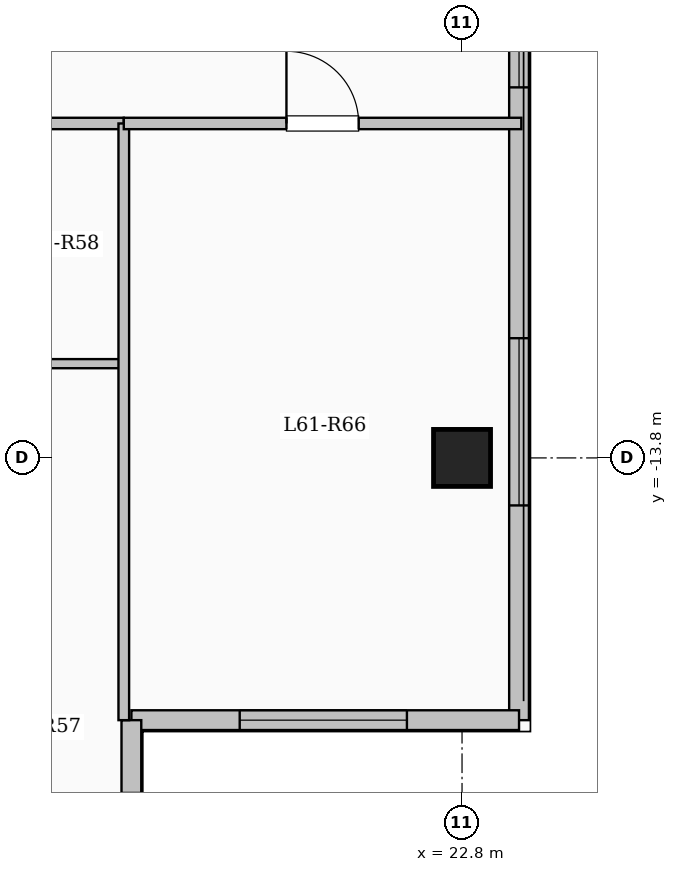
"""IFC4 building model, lengths in metres.
Left out: names, types, materials, properties, quantities, classifications, styles, units other than length and angle.
Written with IfcOpenShell. Run it as: python <this file> out.ifc"""

import sys

from ifc_helpers import new_model, si_unit, direction, frame, frame_2d, origin, origin_2d, place, context, subcontext, project, spatial, rectangle, extrude, element, fill, save


model = new_model("IFC4")
c1 = context("Model", 3, precision=1e-05, world=origin(), true_north=direction((0.0, 1.0)))
c2 = subcontext(c1, "Body", "Model", "MODEL_VIEW")
j1 = project(units=[si_unit("LENGTHUNIT", "METRE"), si_unit("PLANEANGLEUNIT", "RADIAN")], contexts=[c1])
p1 = place(None, origin())
s1 = spatial("IfcSite", under=j1, at=p1, CompositionType="ELEMENT")
p2 = place(p1, origin())
s2 = spatial("IfcBuilding", under=s1, at=p2, CompositionType="ELEMENT")
p3 = place(p2, frame((0.0, 0.0, 223.75)))
s3 = spatial("IfcBuildingStorey", under=s2, at=p3, CompositionType="ELEMENT", Elevation=223.75)
p4 = place(p3, frame((22.8, -13.8, 0.0), z_axis=(0.0, 0.0, 1.0), x_axis=(1.0, 0.0, 0.0)))
e1 = element("IfcColumn", 1, at=p4, inside=s3, PredefinedType="COLUMN", context=c2, shape_type="SweptSolid", body=[
    extrude(rectangle(XDim=0.75, YDim=0.75, at=origin_2d()), origin(), (0.0, 0.0, 1.0), 3.35),
])
p5 = place(p3, frame((23.55, 17.25, 0.0), z_axis=(0.0, 0.0, 1.0), x_axis=(0.0, -1.0, 0.0)))
e2 = element("IfcWall", 2, at=p5, inside=s3, PredefinedType="SOLIDWALL", context=c2, shape_type="SweptSolid", body=[
    extrude(rectangle(XDim=34.5, YDim=0.26, at=frame_2d((17.25, 0.0))), origin(), (0.0, 0.0, 1.0), 3.05),
])
p6 = place(p5, frame((1.375, 0.0, 0.9)))
e3 = element("IfcOpeningElement", 3, at=p6, cuts=e2, PredefinedType="OPENING", context=c2, shape_type="SweptSolid", body=[
    extrude(rectangle(XDim=2.0, YDim=1.7, at=frame_2d((1.0, 0.85))), frame((0.0, 0.14, 0.0), z_axis=(0.0, -1.0, 0.0), x_axis=(1.0, 0.0, 0.0)), (0.0, 0.0, 1.0), 0.28),
])
p7 = place(p5, frame((5.125, 0.0, 0.95)))
e4 = element("IfcOpeningElement", 4, at=p7, cuts=e2, PredefinedType="OPENING", context=c2, shape_type="SweptSolid", body=[
    extrude(rectangle(XDim=1.0, YDim=1.5, at=frame_2d((0.5, 0.75))), frame((0.0, 0.14, 0.0), z_axis=(0.0, -1.0, 0.0), x_axis=(1.0, 0.0, 0.0)), (0.0, 0.0, 1.0), 0.28),
])
p8 = place(p5, frame((8.375, 0.0, 0.9)))
e5 = element("IfcOpeningElement", 5, at=p8, cuts=e2, PredefinedType="OPENING", context=c2, shape_type="SweptSolid", body=[
    extrude(rectangle(XDim=2.0, YDim=1.7, at=frame_2d((1.0, 0.85))), frame((0.0, 0.14, 0.0), z_axis=(0.0, -1.0, 0.0), x_axis=(1.0, 0.0, 0.0)), (0.0, 0.0, 1.0), 0.28),
])
p9 = place(p5, frame((13.2, 0.0, 0.9)))
e6 = element("IfcOpeningElement", 6, at=p9, cuts=e2, PredefinedType="OPENING", context=c2, shape_type="SweptSolid", body=[
    extrude(rectangle(XDim=1.65, YDim=1.6, at=frame_2d((0.825, 0.8))), frame((0.0, 0.14, 0.0), z_axis=(0.0, -1.0, 0.0), x_axis=(1.0, 0.0, 0.0)), (0.0, 0.0, 1.0), 0.28),
])
p10 = place(p5, frame((19.05, 0.0, 0.9)))
e7 = element("IfcOpeningElement", 7, at=p10, cuts=e2, PredefinedType="OPENING", context=c2, shape_type="SweptSolid", body=[
    extrude(rectangle(XDim=2.2, YDim=1.75, at=frame_2d((1.1, 0.875))), frame((0.0, 0.14, 0.0), z_axis=(0.0, -1.0, 0.0), x_axis=(1.0, 0.0, 0.0)), (0.0, 0.0, 1.0), 0.28),
])
p11 = place(p5, frame((24.975, 0.0, 0.95)))
e8 = element("IfcOpeningElement", 8, at=p11, cuts=e2, PredefinedType="OPENING", context=c2, shape_type="SweptSolid", body=[
    extrude(rectangle(XDim=1.2, YDim=1.5, at=frame_2d((0.6, 0.75))), frame((0.0, 0.14, 0.0), z_axis=(0.0, -1.0, 0.0), x_axis=(1.0, 0.0, 0.0)), (0.0, 0.0, 1.0), 0.28),
])
p12 = place(p5, frame((29.475, 0.0, 0.9)))
e9 = element("IfcOpeningElement", 9, at=p12, cuts=e2, PredefinedType="OPENING", context=c2, shape_type="SweptSolid", body=[
    extrude(rectangle(XDim=2.2, YDim=1.75, at=frame_2d((1.1, 0.875))), frame((0.0, 0.14, 0.0), z_axis=(0.0, -1.0, 0.0), x_axis=(1.0, 0.0, 0.0)), (0.0, 0.0, 1.0), 0.28),
])
p13 = place(p3, frame((23.55, -17.25, 0.0), z_axis=(0.0, 0.0, 1.0), x_axis=(-1.0, 0.0, 0.0)))
e10 = element("IfcWall", 10, at=p13, inside=s3, PredefinedType="SOLIDWALL", context=c2, shape_type="SweptSolid", body=[
    extrude(rectangle(XDim=5.1, YDim=0.26, at=frame_2d((2.55, 0.0))), origin(), (0.0, 0.0, 1.0), 3.05),
])
p14 = place(p13, frame((1.475, 0.0, 0.9)))
e11 = element("IfcOpeningElement", 11, at=p14, cuts=e10, PredefinedType="OPENING", context=c2, shape_type="SweptSolid", body=[
    extrude(rectangle(XDim=2.2, YDim=1.75, at=frame_2d((1.1, 0.875))), frame((0.0, 0.14, 0.0), z_axis=(0.0, -1.0, 0.0), x_axis=(1.0, 0.0, 0.0)), (0.0, 0.0, 1.0), 0.28),
])
p15 = place(p3, frame((18.45, -17.25, 0.0), z_axis=(0.0, 0.0, 1.0), x_axis=(0.0, -1.0, 0.0)))
e12 = element("IfcWall", 12, at=p15, inside=s3, PredefinedType="SOLIDWALL", context=c2, shape_type="SweptSolid", body=[
    extrude(rectangle(XDim=3.6, YDim=0.26, at=frame_2d((1.8, 0.0))), origin(), (0.0, 0.0, 1.0), 3.05),
])
p16 = place(p15, frame((0.958, 0.0, 0.9)))
e13 = element("IfcOpeningElement", 13, at=p16, cuts=e12, PredefinedType="OPENING", context=c2, shape_type="SweptSolid", body=[
    extrude(rectangle(XDim=1.65, YDim=1.6, at=frame_2d((0.825, 0.8))), frame((0.0, 0.14, 0.0), z_axis=(0.0, -1.0, 0.0), x_axis=(1.0, 0.0, 0.0)), (0.0, 0.0, 1.0), 0.28),
])
p17 = place(p3, frame((8.55, -9.4, 0.0), z_axis=(0.0, 0.0, 1.0), x_axis=(1.0, 0.0, 0.0)))
e14 = element("IfcWall", 14, at=p17, inside=s3, PredefinedType="PARTITIONING", context=c2, shape_type="SweptSolid", body=[
    extrude(rectangle(XDim=9.8, YDim=0.15, at=frame_2d((4.9, 0.0))), origin(), (0.0, 0.0, 1.0), 3.05),
])
p18 = place(p17, frame((0.9, 0.0, 0.0)))
e15 = element("IfcOpeningElement", 15, at=p18, cuts=e14, PredefinedType="OPENING", context=c2, shape_type="SweptSolid", body=[
    extrude(rectangle(XDim=0.96, YDim=2.15, at=frame_2d((0.48, 1.075))), frame((0.0, 0.085, 0.0), z_axis=(0.0, -1.0, 0.0), x_axis=(1.0, 0.0, 0.0)), (0.0, 0.0, 1.0), 0.17),
])
p19 = place(p17, frame((5.82, 0.0, 0.0)))
e16 = element("IfcOpeningElement", 16, at=p19, cuts=e14, PredefinedType="OPENING", context=c2, shape_type="SweptSolid", body=[
    extrude(rectangle(XDim=0.96, YDim=2.15, at=frame_2d((0.48, 1.075))), frame((0.0, 0.085, 0.0), z_axis=(0.0, -1.0, 0.0), x_axis=(1.0, 0.0, 0.0)), (0.0, 0.0, 1.0), 0.17),
])
p20 = place(p3, frame((16.07, -12.56, 0.0), z_axis=(0.0, 0.0, 1.0), x_axis=(1.0, 0.0, 0.0)))
e17 = element("IfcWall", 17, at=p20, inside=s3, PredefinedType="PARTITIONING", context=c2, shape_type="SweptSolid", body=[
    extrude(rectangle(XDim=2.34, YDim=0.12, at=frame_2d((1.17, 0.0))), origin(), (0.0, 0.0, 1.0), 3.05),
])
p21 = place(p3, frame((18.35, -17.25, 0.0), z_axis=(0.0, 0.0, 1.0), x_axis=(0.0, 1.0, 0.0)))
e18 = element("IfcWall", 18, at=p21, inside=s3, PredefinedType="PARTITIONING", context=c2, shape_type="SweptSolid", body=[
    extrude(rectangle(XDim=7.85, YDim=0.14, at=frame_2d((3.925, 0.0))), origin(), (0.0, 0.0, 1.0), 3.05),
])
p22 = place(p3, frame((18.35, -9.4, 0.0), z_axis=(0.0, 0.0, 1.0), x_axis=(1.0, 0.0, 0.0)))
e19 = element("IfcWall", 19, at=p22, inside=s3, PredefinedType="PARTITIONING", context=c2, shape_type="SweptSolid", body=[
    extrude(rectangle(XDim=5.23, YDim=0.15, at=frame_2d((2.615, 0.0))), origin(), (0.0, 0.0, 1.0), 3.05),
])
p23 = place(p22, frame((2.14, 0.0, 0.0)))
e20 = element("IfcOpeningElement", 20, at=p23, cuts=e19, PredefinedType="OPENING", context=c2, shape_type="SweptSolid", body=[
    extrude(rectangle(XDim=0.95, YDim=2.15, at=frame_2d((0.475, 1.075))), frame((0.0, 0.085, 0.0), z_axis=(0.0, -1.0, 0.0), x_axis=(1.0, 0.0, 0.0)), (0.0, 0.0, 1.0), 0.17),
])
p24 = place(p11, origin())
e21 = element("IfcWindow", 21, at=p24, inside=s3, PartitioningType="SINGLE_PANEL", PredefinedType="WINDOW", context=c2, shape_type="SweptSolid", body=[
    extrude(rectangle(XDim=1.2, YDim=1.5, at=frame_2d((0.6, 0.75))), frame((0.0, 0.03, 0.0), z_axis=(0.0, -1.0, 0.0), x_axis=(1.0, 0.0, 0.0)), (0.0, 0.0, 1.0), 0.06),
])
fill(e8, e21)
p25 = place(p12, origin())
e22 = element("IfcWindow", 22, at=p25, inside=s3, PartitioningType="SINGLE_PANEL", PredefinedType="WINDOW", context=c2, shape_type="SweptSolid", body=[
    extrude(rectangle(XDim=2.2, YDim=1.75, at=frame_2d((1.1, 0.875))), frame((0.0, 0.03, 0.0), z_axis=(0.0, -1.0, 0.0), x_axis=(1.0, 0.0, 0.0)), (0.0, 0.0, 1.0), 0.06),
])
fill(e9, e22)
p26 = place(p14, origin())
e23 = element("IfcWindow", 23, at=p26, inside=s3, PartitioningType="SINGLE_PANEL", PredefinedType="WINDOW", context=c2, shape_type="SweptSolid", body=[
    extrude(rectangle(XDim=2.2, YDim=1.75, at=frame_2d((1.1, 0.875))), frame((0.0, 0.03, 0.0), z_axis=(0.0, -1.0, 0.0), x_axis=(1.0, 0.0, 0.0)), (0.0, 0.0, 1.0), 0.06),
])
fill(e11, e23)
p27 = place(p23, origin())
e24 = element("IfcDoor", 24, at=p27, inside=s3, OperationType="SINGLE_SWING_LEFT", PredefinedType="DOOR", context=c2, shape_type="SweptSolid", body=[
    extrude(rectangle(XDim=0.95, YDim=2.15, at=frame_2d((0.475, 1.075))), frame((0.0, 0.025, 0.0), z_axis=(0.0, -1.0, 0.0), x_axis=(1.0, 0.0, 0.0)), (0.0, 0.0, 1.0), 0.05),
])
fill(e20, e24)
save(model, sys.argv[1])
